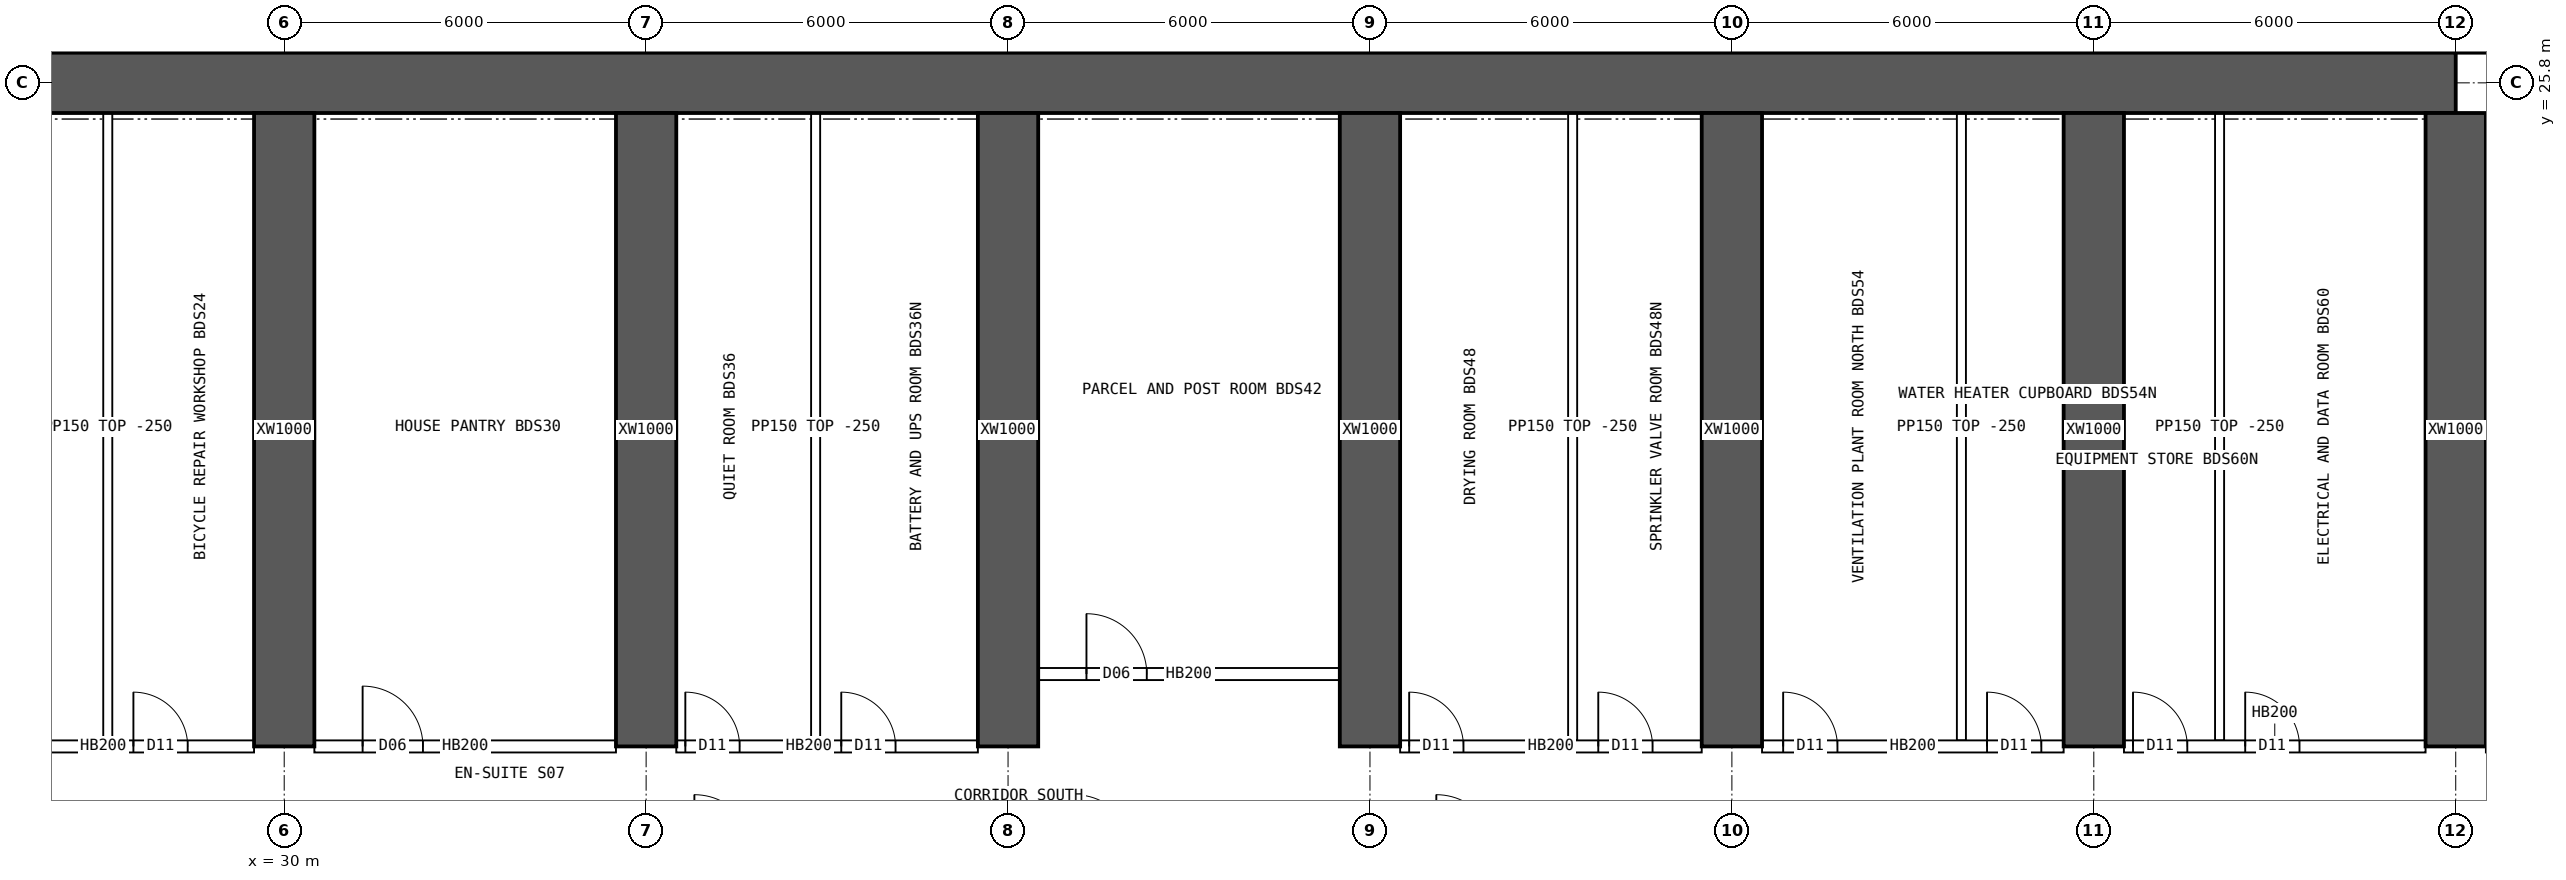
"""IFC4 building model, lengths in metres.
Left out: names, types, materials, properties, quantities, classifications, styles, units other than length and angle.
Written with IfcOpenShell. Run it as: python <this file> out.ifc"""

import sys

from ifc_helpers import new_model, si_unit, direction, frame, frame_2d, origin, place, context, subcontext, project, spatial, rectangle, extrude, element, fill, save


model = new_model("IFC4")
c1 = context("Model", 3, precision=1e-05, world=origin(), true_north=direction((0.0, 1.0)))
c2 = subcontext(c1, "Body", "Model", "MODEL_VIEW")
j1 = project(units=[si_unit("LENGTHUNIT", "METRE"), si_unit("PLANEANGLEUNIT", "RADIAN")], contexts=[c1])
p1 = place(None, origin())
s1 = spatial("IfcSite", under=j1, at=p1, CompositionType="ELEMENT")
p2 = place(p1, origin())
s2 = spatial("IfcBuilding", under=s1, at=p2, CompositionType="ELEMENT")
p3 = place(p2, frame((0.0, 0.0, 31.45)))
s3 = spatial("IfcBuildingStorey", under=s2, at=p3, CompositionType="ELEMENT", Elevation=31.45)
p4 = place(p3, frame((18.0, 25.8, 0.0), z_axis=(0.0, 0.0, 1.0), x_axis=(1.0, 0.0, 0.0)))
e1 = element("IfcWall", 1, at=p4, inside=s3, PredefinedType="SHEAR", context=c2, shape_type="SweptSolid", body=[
    extrude(rectangle(XDim=48.0, YDim=1.0, at=frame_2d((24.0, 0.0))), origin(), (0.0, 0.0, 1.0), 3.75),
])
for number, where, z_axis, x_axis in (
    (2, (30.0, 14.8, 0.0), (0.0, 0.0, 1.0), (0.0, 1.0, 0.0)),
    (3, (36.0, 14.8, 0.0), (0.0, 0.0, 1.0), (0.0, 1.0, 0.0)),
    (4, (42.0, 14.8, 0.0), (0.0, 0.0, 1.0), (0.0, 1.0, 0.0)),
    (5, (48.0, 14.8, 0.0), (0.0, 0.0, 1.0), (0.0, 1.0, 0.0)),
    (6, (54.0, 14.8, 0.0), (0.0, 0.0, 1.0), (0.0, 1.0, 0.0)),
    (7, (60.0, 14.8, 0.0), (0.0, 0.0, 1.0), (0.0, 1.0, 0.0)),
    (8, (66.0, 14.8, 0.0), (0.0, 0.0, 1.0), (0.0, 1.0, 0.0)),
):
    element("IfcWall", number, at=place(p3, frame(where, z_axis=z_axis, x_axis=x_axis)), inside=s3, PredefinedType="SHEAR", context=c2, shape_type="SweptSolid", body=[
        extrude(rectangle(XDim=10.5, YDim=1.0, at=frame_2d((5.25, 0.0))), origin(), (0.0, 0.0, 1.0), 3.75),
    ])
p5 = place(p3, frame((24.5, 14.8, 0.0), z_axis=(0.0, 0.0, 1.0), x_axis=(1.0, 0.0, 0.0)))
e9 = element("IfcWall", 9, at=p5, inside=s3, PredefinedType="SOLIDWALL", context=c2, shape_type="SweptSolid", body=[
    extrude(rectangle(XDim=5.0, YDim=0.2, at=frame_2d((2.5, 0.0))), origin(), (0.0, 0.0, 1.0), 3.5),
])
p6 = place(p5, frame((0.15, 0.0, 0.0)))
e10 = element("IfcOpeningElement", 10, at=p6, cuts=e9, PredefinedType="OPENING", context=c2, shape_type="SweptSolid", body=[
    extrude(rectangle(XDim=0.9, YDim=2.1, at=frame_2d((0.45, 1.05))), frame((0.0, 0.11, 0.0), z_axis=(0.0, -1.0, 0.0), x_axis=(1.0, 0.0, 0.0)), (0.0, 0.0, 1.0), 0.22),
])
p7 = place(p5, frame((3.0, 0.0, 0.0)))
e11 = element("IfcOpeningElement", 11, at=p7, cuts=e9, PredefinedType="OPENING", context=c2, shape_type="SweptSolid", body=[
    extrude(rectangle(XDim=0.9, YDim=2.1, at=frame_2d((0.45, 1.05))), frame((0.0, 0.11, 0.0), z_axis=(0.0, -1.0, 0.0), x_axis=(1.0, 0.0, 0.0)), (0.0, 0.0, 1.0), 0.22),
])
p8 = place(p3, frame((30.5, 14.8, 0.0), z_axis=(0.0, 0.0, 1.0), x_axis=(1.0, 0.0, 0.0)))
e12 = element("IfcWall", 12, at=p8, inside=s3, PredefinedType="SOLIDWALL", context=c2, shape_type="SweptSolid", body=[
    extrude(rectangle(XDim=5.0, YDim=0.2, at=frame_2d((2.5, 0.0))), origin(), (0.0, 0.0, 1.0), 3.5),
])
p9 = place(p8, frame((0.8, 0.0, 0.0)))
e13 = element("IfcOpeningElement", 13, at=p9, cuts=e12, PredefinedType="OPENING", context=c2, shape_type="SweptSolid", body=[
    extrude(rectangle(XDim=1.0, YDim=2.1, at=frame_2d((0.5, 1.05))), frame((0.0, 0.11, 0.0), z_axis=(0.0, -1.0, 0.0), x_axis=(1.0, 0.0, 0.0)), (0.0, 0.0, 1.0), 0.22),
])
p10 = place(p3, frame((36.5, 14.8, 0.0), z_axis=(0.0, 0.0, 1.0), x_axis=(1.0, 0.0, 0.0)))
e14 = element("IfcWall", 14, at=p10, inside=s3, PredefinedType="SOLIDWALL", context=c2, shape_type="SweptSolid", body=[
    extrude(rectangle(XDim=5.0, YDim=0.2, at=frame_2d((2.5, 0.0))), origin(), (0.0, 0.0, 1.0), 3.5),
])
p11 = place(p10, frame((0.15, 0.0, 0.0)))
e15 = element("IfcOpeningElement", 15, at=p11, cuts=e14, PredefinedType="OPENING", context=c2, shape_type="SweptSolid", body=[
    extrude(rectangle(XDim=0.9, YDim=2.1, at=frame_2d((0.45, 1.05))), frame((0.0, 0.11, 0.0), z_axis=(0.0, -1.0, 0.0), x_axis=(1.0, 0.0, 0.0)), (0.0, 0.0, 1.0), 0.22),
])
p12 = place(p10, frame((2.735, 0.0, 0.0)))
e16 = element("IfcOpeningElement", 16, at=p12, cuts=e14, PredefinedType="OPENING", context=c2, shape_type="SweptSolid", body=[
    extrude(rectangle(XDim=0.9, YDim=2.1, at=frame_2d((0.45, 1.05))), frame((0.0, 0.11, 0.0), z_axis=(0.0, -1.0, 0.0), x_axis=(1.0, 0.0, 0.0)), (0.0, 0.0, 1.0), 0.22),
])
p13 = place(p3, frame((48.5, 14.8, 0.0), z_axis=(0.0, 0.0, 1.0), x_axis=(1.0, 0.0, 0.0)))
e17 = element("IfcWall", 17, at=p13, inside=s3, PredefinedType="SOLIDWALL", context=c2, shape_type="SweptSolid", body=[
    extrude(rectangle(XDim=5.0, YDim=0.2, at=frame_2d((2.5, 0.0))), origin(), (0.0, 0.0, 1.0), 3.5),
])
p14 = place(p13, frame((0.15, 0.0, 0.0)))
e18 = element("IfcOpeningElement", 18, at=p14, cuts=e17, PredefinedType="OPENING", context=c2, shape_type="SweptSolid", body=[
    extrude(rectangle(XDim=0.9, YDim=2.1, at=frame_2d((0.45, 1.05))), frame((0.0, 0.11, 0.0), z_axis=(0.0, -1.0, 0.0), x_axis=(1.0, 0.0, 0.0)), (0.0, 0.0, 1.0), 0.22),
])
p15 = place(p13, frame((3.285, 0.0, 0.0)))
e19 = element("IfcOpeningElement", 19, at=p15, cuts=e17, PredefinedType="OPENING", context=c2, shape_type="SweptSolid", body=[
    extrude(rectangle(XDim=0.9, YDim=2.1, at=frame_2d((0.45, 1.05))), frame((0.0, 0.11, 0.0), z_axis=(0.0, -1.0, 0.0), x_axis=(1.0, 0.0, 0.0)), (0.0, 0.0, 1.0), 0.22),
])
p16 = place(p3, frame((54.5, 14.8, 0.0), z_axis=(0.0, 0.0, 1.0), x_axis=(1.0, 0.0, 0.0)))
e20 = element("IfcWall", 20, at=p16, inside=s3, PredefinedType="SOLIDWALL", context=c2, shape_type="SweptSolid", body=[
    extrude(rectangle(XDim=5.0, YDim=0.2, at=frame_2d((2.5, 0.0))), origin(), (0.0, 0.0, 1.0), 3.5),
])
p17 = place(p16, frame((0.35, 0.0, 0.0)))
e21 = element("IfcOpeningElement", 21, at=p17, cuts=e20, PredefinedType="OPENING", context=c2, shape_type="SweptSolid", body=[
    extrude(rectangle(XDim=0.9, YDim=2.1, at=frame_2d((0.45, 1.05))), frame((0.0, 0.11, 0.0), z_axis=(0.0, -1.0, 0.0), x_axis=(1.0, 0.0, 0.0)), (0.0, 0.0, 1.0), 0.22),
])
p18 = place(p16, frame((3.73, 0.0, 0.0)))
e22 = element("IfcOpeningElement", 22, at=p18, cuts=e20, PredefinedType="OPENING", context=c2, shape_type="SweptSolid", body=[
    extrude(rectangle(XDim=0.9, YDim=2.1, at=frame_2d((0.45, 1.05))), frame((0.0, 0.11, 0.0), z_axis=(0.0, -1.0, 0.0), x_axis=(1.0, 0.0, 0.0)), (0.0, 0.0, 1.0), 0.22),
])
p19 = place(p3, frame((60.5, 14.8, 0.0), z_axis=(0.0, 0.0, 1.0), x_axis=(1.0, 0.0, 0.0)))
e23 = element("IfcWall", 23, at=p19, inside=s3, PredefinedType="SOLIDWALL", context=c2, shape_type="SweptSolid", body=[
    extrude(rectangle(XDim=5.0, YDim=0.2, at=frame_2d((2.5, 0.0))), origin(), (0.0, 0.0, 1.0), 3.5),
])
p20 = place(p19, frame((0.15, 0.0, 0.0)))
e24 = element("IfcOpeningElement", 24, at=p20, cuts=e23, PredefinedType="OPENING", context=c2, shape_type="SweptSolid", body=[
    extrude(rectangle(XDim=0.9, YDim=2.1, at=frame_2d((0.45, 1.05))), frame((0.0, 0.11, 0.0), z_axis=(0.0, -1.0, 0.0), x_axis=(1.0, 0.0, 0.0)), (0.0, 0.0, 1.0), 0.22),
])
p21 = place(p19, frame((2.01, 0.0, 0.0)))
e25 = element("IfcOpeningElement", 25, at=p21, cuts=e23, PredefinedType="OPENING", context=c2, shape_type="SweptSolid", body=[
    extrude(rectangle(XDim=0.9, YDim=2.1, at=frame_2d((0.45, 1.05))), frame((0.0, 0.11, 0.0), z_axis=(0.0, -1.0, 0.0), x_axis=(1.0, 0.0, 0.0)), (0.0, 0.0, 1.0), 0.22),
])
for number, where, z_axis, x_axis in (
    (26, (27.075, 14.9, 0.0), (0.0, 0.0, 1.0), (0.0, 1.0, 0.0)),
    (27, (38.81, 14.9, 0.0), (0.0, 0.0, 1.0), (0.0, 1.0, 0.0)),
):
    element("IfcWall", number, at=place(p3, frame(where, z_axis=z_axis, x_axis=x_axis)), inside=s3, PredefinedType="PARTITIONING", context=c2, shape_type="SweptSolid", body=[
        extrude(rectangle(XDim=10.4, YDim=0.15, at=frame_2d((5.2, 0.0))), origin(), (0.0, 0.0, 1.0), 3.5),
    ])
p22 = place(p3, frame((42.5, 16.0, 0.0), z_axis=(0.0, 0.0, 1.0), x_axis=(1.0, 0.0, 0.0)))
e28 = element("IfcWall", 28, at=p22, inside=s3, PredefinedType="SOLIDWALL", context=c2, shape_type="SweptSolid", body=[
    extrude(rectangle(XDim=5.0, YDim=0.2, at=frame_2d((2.5, 0.0))), origin(), (0.0, 0.0, 1.0), 3.5),
])
p23 = place(p22, frame((0.8, 0.0, 0.0)))
e29 = element("IfcOpeningElement", 29, at=p23, cuts=e28, PredefinedType="OPENING", context=c2, shape_type="SweptSolid", body=[
    extrude(rectangle(XDim=1.0, YDim=2.1, at=frame_2d((0.5, 1.05))), frame((0.0, 0.11, 0.0), z_axis=(0.0, -1.0, 0.0), x_axis=(1.0, 0.0, 0.0)), (0.0, 0.0, 1.0), 0.22),
])
for number, where, z_axis, x_axis in (
    (30, (51.36, 14.9, 0.0), (0.0, 0.0, 1.0), (0.0, 1.0, 0.0)),
    (31, (57.805, 14.9, 0.0), (0.0, 0.0, 1.0), (0.0, 1.0, 0.0)),
    (32, (62.085, 14.9, 0.0), (0.0, 0.0, 1.0), (0.0, 1.0, 0.0)),
):
    element("IfcWall", number, at=place(p3, frame(where, z_axis=z_axis, x_axis=x_axis)), inside=s3, PredefinedType="PARTITIONING", context=c2, shape_type="SweptSolid", body=[
        extrude(rectangle(XDim=10.4, YDim=0.15, at=frame_2d((5.2, 0.0))), origin(), (0.0, 0.0, 1.0), 3.5),
    ])
p24 = place(p7, origin())
e33 = element("IfcDoor", 33, at=p24, inside=s3, OperationType="SINGLE_SWING_LEFT", PredefinedType="DOOR", context=c2, shape_type="SweptSolid", body=[
    extrude(rectangle(XDim=0.9, YDim=2.1, at=frame_2d((0.45, 1.05))), frame((0.0, 0.025, 0.0), z_axis=(0.0, -1.0, 0.0), x_axis=(1.0, 0.0, 0.0)), (0.0, 0.0, 1.0), 0.05),
])
fill(e11, e33)
p25 = place(p9, origin())
e34 = element("IfcDoor", 34, at=p25, inside=s3, OperationType="SINGLE_SWING_LEFT", PredefinedType="DOOR", context=c2, shape_type="SweptSolid", body=[
    extrude(rectangle(XDim=1.0, YDim=2.1, at=frame_2d((0.5, 1.05))), frame((0.0, 0.025, 0.0), z_axis=(0.0, -1.0, 0.0), x_axis=(1.0, 0.0, 0.0)), (0.0, 0.0, 1.0), 0.05),
])
fill(e13, e34)
p26 = place(p11, origin())
e35 = element("IfcDoor", 35, at=p26, inside=s3, OperationType="SINGLE_SWING_LEFT", PredefinedType="DOOR", context=c2, shape_type="SweptSolid", body=[
    extrude(rectangle(XDim=0.9, YDim=2.1, at=frame_2d((0.45, 1.05))), frame((0.0, 0.025, 0.0), z_axis=(0.0, -1.0, 0.0), x_axis=(1.0, 0.0, 0.0)), (0.0, 0.0, 1.0), 0.05),
])
fill(e15, e35)
p27 = place(p12, origin())
e36 = element("IfcDoor", 36, at=p27, inside=s3, OperationType="SINGLE_SWING_LEFT", PredefinedType="DOOR", context=c2, shape_type="SweptSolid", body=[
    extrude(rectangle(XDim=0.9, YDim=2.1, at=frame_2d((0.45, 1.05))), frame((0.0, 0.025, 0.0), z_axis=(0.0, -1.0, 0.0), x_axis=(1.0, 0.0, 0.0)), (0.0, 0.0, 1.0), 0.05),
])
fill(e16, e36)
p28 = place(p23, origin())
e37 = element("IfcDoor", 37, at=p28, inside=s3, OperationType="SINGLE_SWING_LEFT", PredefinedType="DOOR", context=c2, shape_type="SweptSolid", body=[
    extrude(rectangle(XDim=1.0, YDim=2.1, at=frame_2d((0.5, 1.05))), frame((0.0, 0.025, 0.0), z_axis=(0.0, -1.0, 0.0), x_axis=(1.0, 0.0, 0.0)), (0.0, 0.0, 1.0), 0.05),
])
fill(e29, e37)
p29 = place(p14, origin())
e38 = element("IfcDoor", 38, at=p29, inside=s3, OperationType="SINGLE_SWING_LEFT", PredefinedType="DOOR", context=c2, shape_type="SweptSolid", body=[
    extrude(rectangle(XDim=0.9, YDim=2.1, at=frame_2d((0.45, 1.05))), frame((0.0, 0.025, 0.0), z_axis=(0.0, -1.0, 0.0), x_axis=(1.0, 0.0, 0.0)), (0.0, 0.0, 1.0), 0.05),
])
fill(e18, e38)
p30 = place(p15, origin())
e39 = element("IfcDoor", 39, at=p30, inside=s3, OperationType="SINGLE_SWING_LEFT", PredefinedType="DOOR", context=c2, shape_type="SweptSolid", body=[
    extrude(rectangle(XDim=0.9, YDim=2.1, at=frame_2d((0.45, 1.05))), frame((0.0, 0.025, 0.0), z_axis=(0.0, -1.0, 0.0), x_axis=(1.0, 0.0, 0.0)), (0.0, 0.0, 1.0), 0.05),
])
fill(e19, e39)
p31 = place(p17, origin())
e40 = element("IfcDoor", 40, at=p31, inside=s3, OperationType="SINGLE_SWING_LEFT", PredefinedType="DOOR", context=c2, shape_type="SweptSolid", body=[
    extrude(rectangle(XDim=0.9, YDim=2.1, at=frame_2d((0.45, 1.05))), frame((0.0, 0.025, 0.0), z_axis=(0.0, -1.0, 0.0), x_axis=(1.0, 0.0, 0.0)), (0.0, 0.0, 1.0), 0.05),
])
fill(e21, e40)
p32 = place(p18, origin())
e41 = element("IfcDoor", 41, at=p32, inside=s3, OperationType="SINGLE_SWING_LEFT", PredefinedType="DOOR", context=c2, shape_type="SweptSolid", body=[
    extrude(rectangle(XDim=0.9, YDim=2.1, at=frame_2d((0.45, 1.05))), frame((0.0, 0.025, 0.0), z_axis=(0.0, -1.0, 0.0), x_axis=(1.0, 0.0, 0.0)), (0.0, 0.0, 1.0), 0.05),
])
fill(e22, e41)
p33 = place(p20, origin())
e42 = element("IfcDoor", 42, at=p33, inside=s3, OperationType="SINGLE_SWING_LEFT", PredefinedType="DOOR", context=c2, shape_type="SweptSolid", body=[
    extrude(rectangle(XDim=0.9, YDim=2.1, at=frame_2d((0.45, 1.05))), frame((0.0, 0.025, 0.0), z_axis=(0.0, -1.0, 0.0), x_axis=(1.0, 0.0, 0.0)), (0.0, 0.0, 1.0), 0.05),
])
fill(e24, e42)
p34 = place(p21, origin())
e43 = element("IfcDoor", 43, at=p34, inside=s3, OperationType="SINGLE_SWING_LEFT", PredefinedType="DOOR", context=c2, shape_type="SweptSolid", body=[
    extrude(rectangle(XDim=0.9, YDim=2.1, at=frame_2d((0.45, 1.05))), frame((0.0, 0.025, 0.0), z_axis=(0.0, -1.0, 0.0), x_axis=(1.0, 0.0, 0.0)), (0.0, 0.0, 1.0), 0.05),
])
fill(e25, e43)
save(model, sys.argv[1])
